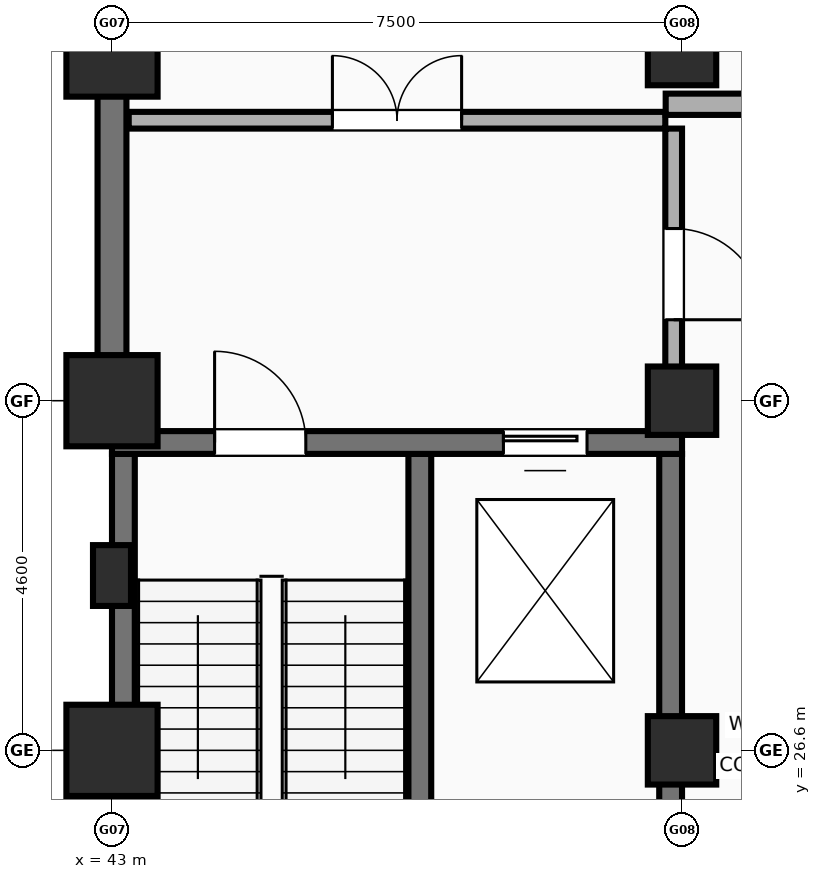
"""IFC4 building model, lengths in metres.
Left out: names, types, materials, properties, quantities, classifications, styles, units other than length and angle.
Written with IfcOpenShell. Run it as: python <this file> out.ifc"""

import sys

from ifc_helpers import new_model, si_unit, direction, frame, frame_2d, origin, origin_2d, place, context, subcontext, project, spatial, rectangle, extrude, element, fill, save


model = new_model("IFC4")
c1 = context("Model", 3, precision=1e-05, world=origin(), true_north=direction((0.0, 1.0)))
c2 = subcontext(c1, "Body", "Model", "MODEL_VIEW")
j1 = project(units=[si_unit("LENGTHUNIT", "METRE"), si_unit("PLANEANGLEUNIT", "RADIAN")], contexts=[c1])
p1 = place(None, origin())
s1 = spatial("IfcSite", under=j1, at=p1, CompositionType="ELEMENT")
p2 = place(p1, origin())
s2 = spatial("IfcBuilding", under=s1, at=p2, CompositionType="ELEMENT")
p3 = place(p2, frame((0.0, 0.0, -4.2)))
s3 = spatial("IfcBuildingStorey", under=s2, at=p3, CompositionType="ELEMENT", Elevation=-4.2)
for number, where, z_axis, x_axis in (
    (1, (43.0, 26.6, -0.42), (0.0, 0.0, 1.0), (1.0, 0.0, 0.0)),
    (2, (43.0, 31.2, -0.42), (0.0, 0.0, 1.0), (1.0, 0.0, 0.0)),
    (3, (43.0, 35.8, -0.42), (0.0, 0.0, 1.0), (1.0, 0.0, 0.0)),
):
    element("IfcColumn", number, at=place(p3, frame(where, z_axis=z_axis, x_axis=x_axis)), inside=s3, PredefinedType="COLUMN", context=c2, shape_type="SweptSolid", body=[
        extrude(rectangle(XDim=1.2, YDim=1.2, at=origin_2d()), origin(), (0.0, 0.0, 1.0), 4.62),
    ])
for number, where, z_axis, x_axis in (
    (4, (50.5, 26.6, -0.42), (0.0, 0.0, 1.0), (1.0, 0.0, 0.0)),
    (5, (50.5, 31.2, -0.42), (0.0, 0.0, 1.0), (1.0, 0.0, 0.0)),
    (6, (50.5, 35.8, -0.42), (0.0, 0.0, 1.0), (1.0, 0.0, 0.0)),
):
    element("IfcColumn", number, at=place(p3, frame(where, z_axis=z_axis, x_axis=x_axis)), inside=s3, PredefinedType="COLUMN", context=c2, shape_type="SweptSolid", body=[
        extrude(rectangle(XDim=0.9, YDim=0.9, at=origin_2d()), origin(), (0.0, 0.0, 1.0), 4.62),
    ])
p4 = place(p3, frame((43.0, 28.9, -0.42), z_axis=(0.0, 0.0, 1.0), x_axis=(1.0, 0.0, 0.0)))
e7 = element("IfcColumn", 7, at=p4, inside=s3, PredefinedType="PILASTER", context=c2, shape_type="SweptSolid", body=[
    extrude(rectangle(XDim=0.5, YDim=0.8, at=origin_2d()), origin(), (0.0, 0.0, 1.0), 4.62),
])
for number, where, z_axis, x_axis in (
    (8, (43.15, 22.3, -0.42), (0.0, 0.0, 1.0), (0.0, 1.0, 0.0)),
    (9, (50.35, 22.3, -0.42), (0.0, 0.0, 1.0), (0.0, 1.0, 0.0)),
    (10, (47.05, 22.3, -0.42), (0.0, 0.0, 1.0), (0.0, 1.0, 0.0)),
):
    element("IfcWall", number, at=place(p3, frame(where, z_axis=z_axis, x_axis=x_axis)), inside=s3, PredefinedType="SHEAR", context=c2, shape_type="SweptSolid", body=[
        extrude(rectangle(XDim=8.2, YDim=0.3, at=frame_2d((4.1, 0.0))), origin(), (0.0, 0.0, 1.0), 4.62),
    ])
p5 = place(p3, frame((43.0, 31.4, -0.42), z_axis=(0.0, 0.0, 1.0), x_axis=(0.0, 1.0, 0.0)))
e11 = element("IfcWall", 11, at=p5, inside=s3, PredefinedType="SHEAR", context=c2, shape_type="SweptSolid", body=[
    extrude(rectangle(XDim=40.55, YDim=0.38, at=frame_2d((20.275, 0.0))), origin(), (0.0, 0.0, 1.0), 4.3),
])
p6 = place(p3, frame((43.0, 30.65, 0.0), z_axis=(0.0, 0.0, 1.0), x_axis=(1.0, 0.0, 0.0)))
e12 = element("IfcWall", 12, at=p6, inside=s3, PredefinedType="SHEAR", context=c2, shape_type="SweptSolid", body=[
    extrude(rectangle(XDim=7.5, YDim=0.3, at=frame_2d((3.75, 0.0))), origin(), (0.0, 0.0, 1.0), 4.2),
])
p7 = place(p6, frame((1.35, 0.0, 0.0)))
e13 = element("IfcOpeningElement", 13, at=p7, cuts=e12, PredefinedType="OPENING", context=c2, shape_type="SweptSolid", body=[
    extrude(rectangle(XDim=1.2, YDim=2.15, at=frame_2d((0.6, 1.075))), frame((0.0, 0.16, 0.0), z_axis=(0.0, -1.0, 0.0), x_axis=(1.0, 0.0, 0.0)), (0.0, 0.0, 1.0), 0.32),
])
p8 = place(p6, frame((5.15, 0.0, 0.0)))
e14 = element("IfcOpeningElement", 14, at=p8, cuts=e12, PredefinedType="OPENING", context=c2, shape_type="SweptSolid", body=[
    extrude(rectangle(XDim=1.1, YDim=2.15, at=frame_2d((0.55, 1.075))), frame((0.0, 0.16, 0.0), z_axis=(0.0, -1.0, 0.0), x_axis=(1.0, 0.0, 0.0)), (0.0, 0.0, 1.0), 0.32),
])
p9 = place(p3, frame((43.22, 34.89, 0.0), z_axis=(0.0, 0.0, 1.0), x_axis=(1.0, 0.0, 0.0)))
e15 = element("IfcWall", 15, at=p9, inside=s3, PredefinedType="SOLIDWALL", context=c2, shape_type="SweptSolid", body=[
    extrude(rectangle(XDim=7.06, YDim=0.22, at=frame_2d((3.53, 0.0))), origin(), (0.0, 0.0, 1.0), 3.16),
])
p10 = place(p9, frame((2.68, 0.0, 0.0)))
e16 = element("IfcOpeningElement", 16, at=p10, cuts=e15, PredefinedType="OPENING", context=c2, shape_type="SweptSolid", body=[
    extrude(rectangle(XDim=1.7, YDim=2.18, at=frame_2d((0.85, 1.09))), frame((0.0, 0.12, 0.0), z_axis=(0.0, -1.0, 0.0), x_axis=(1.0, 0.0, 0.0)), (0.0, 0.0, 1.0), 0.24),
])
p11 = place(p3, frame((50.39, 30.95, 0.0), z_axis=(0.0, 0.0, 1.0), x_axis=(0.0, 1.0, 0.0)))
e17 = element("IfcWall", 17, at=p11, inside=s3, PredefinedType="SOLIDWALL", context=c2, shape_type="SweptSolid", body=[
    extrude(rectangle(XDim=3.83, YDim=0.22, at=frame_2d((1.915, 0.0))), origin(), (0.0, 0.0, 1.0), 2.96),
])
p12 = place(p11, frame((2.515, 0.0, 0.0), z_axis=(0.0, 0.0, 1.0), x_axis=(-1.0, 0.0, 0.0)))
e18 = element("IfcOpeningElement", 18, at=p12, cuts=e17, PredefinedType="OPENING", context=c2, shape_type="SweptSolid", body=[
    extrude(rectangle(XDim=1.2, YDim=2.15, at=frame_2d((0.6, 1.075))), frame((0.0, 0.12, 0.0), z_axis=(0.0, -1.0, 0.0), x_axis=(1.0, 0.0, 0.0)), (0.0, 0.0, 1.0), 0.24),
])
p13 = place(p3, frame((50.285, 35.1, 0.0), z_axis=(0.0, 0.0, 1.0), x_axis=(1.0, 0.0, 0.0)))
e19 = element("IfcWall", 19, at=p13, inside=s3, PredefinedType="SOLIDWALL", context=c2, shape_type="SweptSolid", body=[
    extrude(rectangle(XDim=14.715, YDim=0.28, at=frame_2d((7.357, 0.0))), origin(), (0.0, 0.0, 1.0), 3.16),
])
p14 = place(p13, frame((5.39, 0.0, 0.0)))
e20 = element("IfcOpeningElement", 20, at=p14, cuts=e19, PredefinedType="OPENING", context=c2, shape_type="SweptSolid", body=[
    extrude(rectangle(XDim=1.6, YDim=2.18, at=frame_2d((0.8, 1.09))), frame((0.0, 0.15, 0.0), z_axis=(0.0, -1.0, 0.0), x_axis=(1.0, 0.0, 0.0)), (0.0, 0.0, 1.0), 0.3),
])
p15 = place(p7, origin())
e21 = element("IfcDoor", 21, at=p15, inside=s3, OperationType="SINGLE_SWING_LEFT", PredefinedType="DOOR", context=c2, shape_type="SweptSolid", body=[
    extrude(rectangle(XDim=1.2, YDim=2.15, at=frame_2d((0.6, 1.075))), frame((0.0, 0.025, 0.0), z_axis=(0.0, -1.0, 0.0), x_axis=(1.0, 0.0, 0.0)), (0.0, 0.0, 1.0), 0.05),
])
fill(e13, e21)
p16 = place(p8, origin())
e22 = element("IfcDoor", 22, at=p16, inside=s3, OperationType="SLIDING_TO_LEFT", PredefinedType="DOOR", context=c2, shape_type="SweptSolid", body=[
    extrude(rectangle(XDim=1.1, YDim=2.15, at=frame_2d((0.55, 1.075))), frame((0.0, 0.025, 0.0), z_axis=(0.0, -1.0, 0.0), x_axis=(1.0, 0.0, 0.0)), (0.0, 0.0, 1.0), 0.05),
])
fill(e14, e22)
p17 = place(p10, origin())
e23 = element("IfcDoor", 23, at=p17, inside=s3, OperationType="DOUBLE_DOOR_SINGLE_SWING", PredefinedType="DOOR", context=c2, shape_type="SweptSolid", body=[
    extrude(rectangle(XDim=1.7, YDim=2.18, at=frame_2d((0.85, 1.09))), frame((0.0, 0.025, 0.0), z_axis=(0.0, -1.0, 0.0), x_axis=(1.0, 0.0, 0.0)), (0.0, 0.0, 1.0), 0.05),
])
fill(e16, e23)
p18 = place(p12, origin())
e24 = element("IfcDoor", 24, at=p18, inside=s3, OperationType="SINGLE_SWING_RIGHT", PredefinedType="DOOR", context=c2, shape_type="SweptSolid", body=[
    extrude(rectangle(XDim=1.2, YDim=2.15, at=frame_2d((0.6, 1.075))), frame((0.0, 0.025, 0.0), z_axis=(0.0, -1.0, 0.0), x_axis=(1.0, 0.0, 0.0)), (0.0, 0.0, 1.0), 0.05),
])
fill(e18, e24)
save(model, sys.argv[1])
